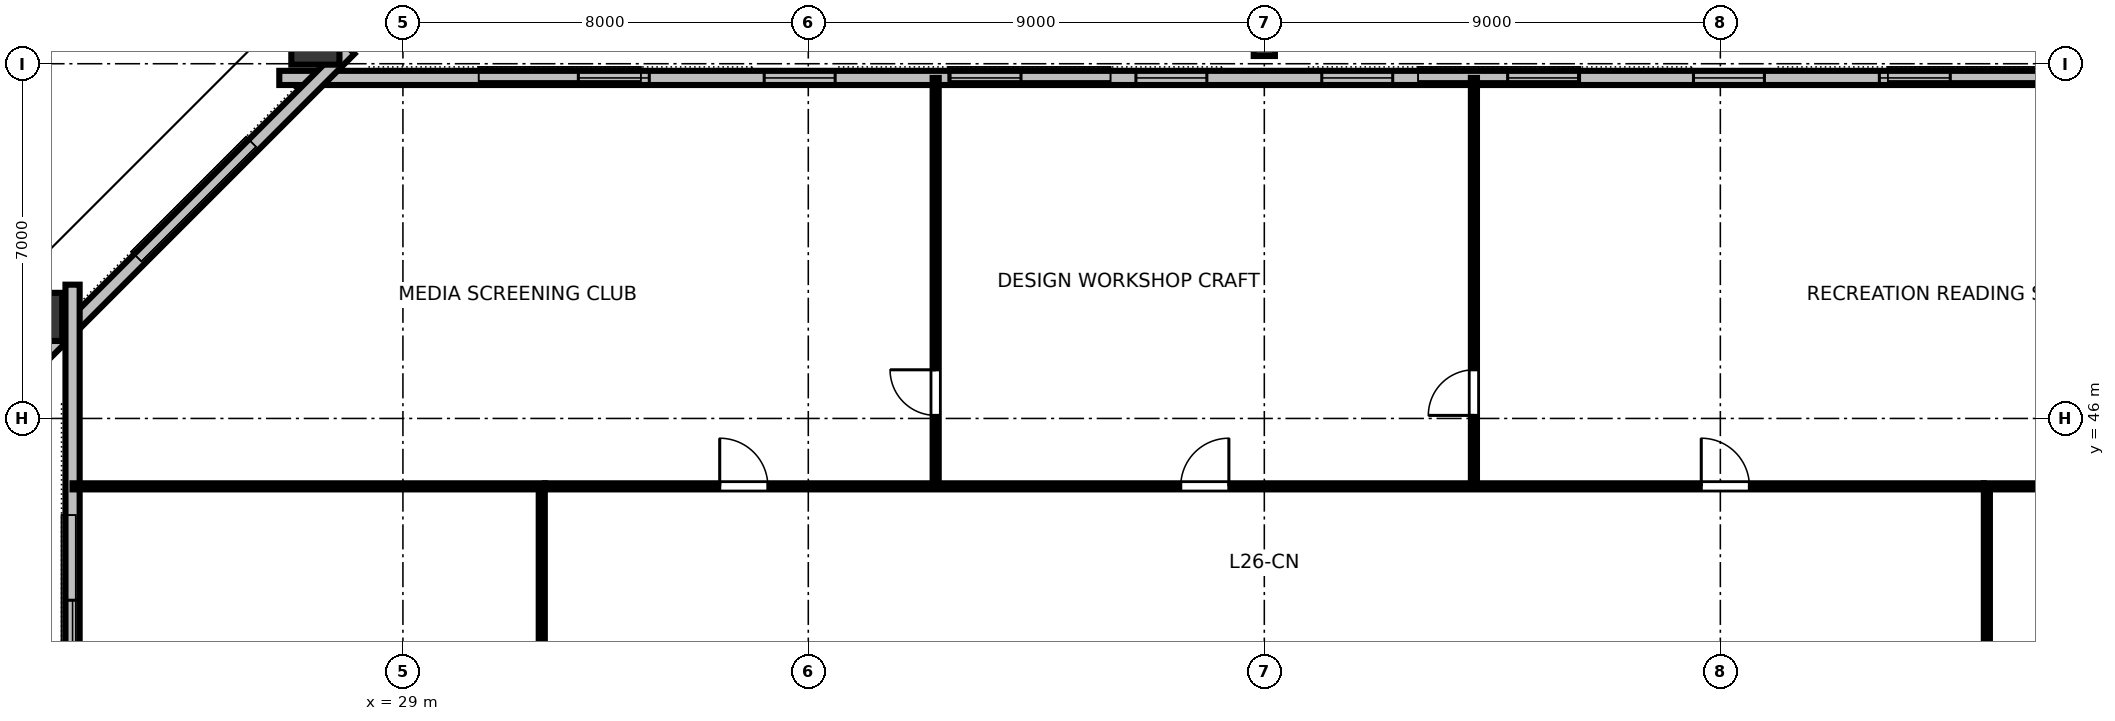
"""IFC4 building model, lengths in metres.
Left out: names, types, materials, properties, quantities, classifications, styles, units other than length and angle.
Written with IfcOpenShell. Run it as: python <this file> out.ifc"""

import sys

from ifc_helpers import new_model, si_unit, direction, frame, frame_2d, origin, origin_2d, place, context, subcontext, project, spatial, rectangle, hollow_rectangle, i_section, extrude, element, fill, save


model = new_model("IFC4")
c1 = context("Model", 3, precision=1e-05, world=origin(), true_north=direction((0.0, 1.0)))
c2 = subcontext(c1, "Body", "Model", "MODEL_VIEW")
j1 = project(units=[si_unit("LENGTHUNIT", "METRE"), si_unit("PLANEANGLEUNIT", "RADIAN")], contexts=[c1])
p1 = place(None, origin())
s1 = spatial("IfcSite", under=j1, at=p1, CompositionType="ELEMENT")
p2 = place(p1, origin())
s2 = spatial("IfcBuilding", under=s1, at=p2, CompositionType="ELEMENT")
p3 = place(p2, frame((0.0, 0.0, 102.4)))
s3 = spatial("IfcBuildingStorey", under=s2, at=p3, CompositionType="ELEMENT", Elevation=102.4)
p4 = place(p3, frame((46.0, 53.38, 0.0), z_axis=(0.0, -0.161571146621, 0.986861066503), x_axis=(1.0, 0.0, 0.0)))
e1 = element("IfcColumn", 1, at=p4, inside=s3, PredefinedType="COLUMN", context=c2, shape_type="SweptSolid", body=[
    extrude(i_section(OverallWidth=0.418, OverallDepth=0.455, WebThickness=0.042, FlangeThickness=0.068, FilletRadius=0.025, at=origin_2d()), origin(), (0.0, 0.0, 1.0), 3.403),
])
p5 = place(p3, frame((27.272, 53.556, 0.0), z_axis=(0.227502922189, -0.158490675606, 0.960792967367), x_axis=(0.571617951621, 0.820519906757, 0.0)))
e2 = element("IfcColumn", 2, at=p5, inside=s3, PredefinedType="COLUMN", context=c2, shape_type="SweptSolid", body=[
    extrude(hollow_rectangle(XDim=0.95, YDim=1.15, WallThickness=0.06, at=origin_2d()), origin(), (0.0, 0.0, 1.0), 3.495),
])
p6 = place(p3, frame((21.701, 48.004, 0.0), z_axis=(0.187073570433, -0.199172160222, 0.961942789275), x_axis=(-0.658567101109, 0.701158543536, 0.273250928932)))
e3 = element("IfcColumn", 3, at=p6, inside=s3, PredefinedType="COLUMN", context=c2, shape_type="SweptSolid", body=[
    extrude(hollow_rectangle(XDim=0.95, YDim=1.15, WallThickness=0.06, at=origin_2d()), origin(), (0.0, 0.0, 1.0), 3.491),
])
p7 = place(p3, frame((65.44, 52.72, 0.0), z_axis=(0.0, 0.0, 1.0), x_axis=(-1.0, 0.0, 0.0)))
e4 = element("IfcWall", 4, at=p7, inside=s3, PredefinedType="STANDARD", context=c2, shape_type="SweptSolid", body=[
    extrude(rectangle(XDim=38.88, YDim=0.28, at=frame_2d((19.44, 0.0))), origin(), (0.0, 0.0, 1.0), 2.662),
])
p8 = place(p7, frame((5.902, 0.0, 0.85)))
e5 = element("IfcOpeningElement", 5, at=p8, cuts=e4, PredefinedType="OPENING", context=c2, shape_type="SweptSolid", body=[
    extrude(rectangle(XDim=1.4, YDim=1.2, at=frame_2d((0.7, 0.6))), frame((0.0, 0.15, 0.0), z_axis=(0.0, -1.0, 0.0), x_axis=(1.0, 0.0, 0.0)), (0.0, 0.0, 1.0), 0.3),
])
p9 = place(p7, frame((9.57, 0.0, 0.85)))
e6 = element("IfcOpeningElement", 6, at=p9, cuts=e4, PredefinedType="OPENING", context=c2, shape_type="SweptSolid", body=[
    extrude(rectangle(XDim=1.4, YDim=1.2, at=frame_2d((0.7, 0.6))), frame((0.0, 0.15, 0.0), z_axis=(0.0, -1.0, 0.0), x_axis=(1.0, 0.0, 0.0)), (0.0, 0.0, 1.0), 0.3),
])
p10 = place(p7, frame((13.238, 0.0, 0.85)))
e7 = element("IfcOpeningElement", 7, at=p10, cuts=e4, PredefinedType="OPENING", context=c2, shape_type="SweptSolid", body=[
    extrude(rectangle(XDim=1.4, YDim=1.2, at=frame_2d((0.7, 0.6))), frame((0.0, 0.15, 0.0), z_axis=(0.0, -1.0, 0.0), x_axis=(1.0, 0.0, 0.0)), (0.0, 0.0, 1.0), 0.3),
])
p11 = place(p7, frame((16.906, 0.0, 0.85)))
e8 = element("IfcOpeningElement", 8, at=p11, cuts=e4, PredefinedType="OPENING", context=c2, shape_type="SweptSolid", body=[
    extrude(rectangle(XDim=1.4, YDim=1.2, at=frame_2d((0.7, 0.6))), frame((0.0, 0.15, 0.0), z_axis=(0.0, -1.0, 0.0), x_axis=(1.0, 0.0, 0.0)), (0.0, 0.0, 1.0), 0.3),
])
p12 = place(p7, frame((20.574, 0.0, 0.85)))
e9 = element("IfcOpeningElement", 9, at=p12, cuts=e4, PredefinedType="OPENING", context=c2, shape_type="SweptSolid", body=[
    extrude(rectangle(XDim=1.4, YDim=1.2, at=frame_2d((0.7, 0.6))), frame((0.0, 0.15, 0.0), z_axis=(0.0, -1.0, 0.0), x_axis=(1.0, 0.0, 0.0)), (0.0, 0.0, 1.0), 0.3),
])
p13 = place(p7, frame((24.242, 0.0, 0.85)))
e10 = element("IfcOpeningElement", 10, at=p13, cuts=e4, PredefinedType="OPENING", context=c2, shape_type="SweptSolid", body=[
    extrude(rectangle(XDim=1.4, YDim=1.2, at=frame_2d((0.7, 0.6))), frame((0.0, 0.15, 0.0), z_axis=(0.0, -1.0, 0.0), x_axis=(1.0, 0.0, 0.0)), (0.0, 0.0, 1.0), 0.3),
])
p14 = place(p7, frame((27.91, 0.0, 0.85)))
e11 = element("IfcOpeningElement", 11, at=p14, cuts=e4, PredefinedType="OPENING", context=c2, shape_type="SweptSolid", body=[
    extrude(rectangle(XDim=1.4, YDim=1.2, at=frame_2d((0.7, 0.6))), frame((0.0, 0.15, 0.0), z_axis=(0.0, -1.0, 0.0), x_axis=(1.0, 0.0, 0.0)), (0.0, 0.0, 1.0), 0.3),
])
p15 = place(p7, frame((31.578, 0.0, 0.85)))
e12 = element("IfcOpeningElement", 12, at=p15, cuts=e4, PredefinedType="OPENING", context=c2, shape_type="SweptSolid", body=[
    extrude(rectangle(XDim=1.4, YDim=1.2, at=frame_2d((0.7, 0.6))), frame((0.0, 0.15, 0.0), z_axis=(0.0, -1.0, 0.0), x_axis=(1.0, 0.0, 0.0)), (0.0, 0.0, 1.0), 0.3),
])
p16 = place(p3, frame((27.946, 53.294, 0.0), z_axis=(0.0, 0.0, 1.0), x_axis=(-0.707106781187, -0.707106781187, 0.0)))
e13 = element("IfcWall", 13, at=p16, inside=s3, PredefinedType="STANDARD", context=c2, shape_type="SweptSolid", body=[
    extrude(rectangle(XDim=8.541, YDim=0.28, at=frame_2d((4.271, 0.0))), origin(), (0.0, 0.0, 1.0), 2.662),
])
p17 = place(p3, frame((22.48, 48.64, 0.0), z_axis=(0.0, 0.0, 1.0), x_axis=(0.0, -1.0, 0.0)))
e14 = element("IfcWall", 14, at=p17, inside=s3, PredefinedType="STANDARD", context=c2, shape_type="SweptSolid", body=[
    extrude(rectangle(XDim=33.28, YDim=0.28, at=frame_2d((16.64, 0.0))), origin(), (0.0, 0.0, 1.0), 2.662),
])
p18 = place(p17, frame((6.228, 0.0, 0.85)))
e15 = element("IfcOpeningElement", 15, at=p18, cuts=e14, PredefinedType="OPENING", context=c2, shape_type="SweptSolid", body=[
    extrude(rectangle(XDim=1.4, YDim=1.2, at=frame_2d((0.7, 0.6))), frame((0.0, 0.15, 0.0), z_axis=(0.0, -1.0, 0.0), x_axis=(1.0, 0.0, 0.0)), (0.0, 0.0, 1.0), 0.3),
])
p19 = place(p17, frame((10.113, 0.0, 0.85)))
e16 = element("IfcOpeningElement", 16, at=p19, cuts=e14, PredefinedType="OPENING", context=c2, shape_type="SweptSolid", body=[
    extrude(rectangle(XDim=1.4, YDim=1.2, at=frame_2d((0.7, 0.6))), frame((0.0, 0.15, 0.0), z_axis=(0.0, -1.0, 0.0), x_axis=(1.0, 0.0, 0.0)), (0.0, 0.0, 1.0), 0.3),
])
p20 = place(p17, frame((13.998, 0.0, 0.85)))
e17 = element("IfcOpeningElement", 17, at=p20, cuts=e14, PredefinedType="OPENING", context=c2, shape_type="SweptSolid", body=[
    extrude(rectangle(XDim=1.4, YDim=1.2, at=frame_2d((0.7, 0.6))), frame((0.0, 0.15, 0.0), z_axis=(0.0, -1.0, 0.0), x_axis=(1.0, 0.0, 0.0)), (0.0, 0.0, 1.0), 0.3),
])
p21 = place(p17, frame((17.883, 0.0, 0.85)))
e18 = element("IfcOpeningElement", 18, at=p21, cuts=e14, PredefinedType="OPENING", context=c2, shape_type="SweptSolid", body=[
    extrude(rectangle(XDim=1.4, YDim=1.2, at=frame_2d((0.7, 0.6))), frame((0.0, 0.15, 0.0), z_axis=(0.0, -1.0, 0.0), x_axis=(1.0, 0.0, 0.0)), (0.0, 0.0, 1.0), 0.3),
])
p22 = place(p17, frame((21.768, 0.0, 0.85)))
e19 = element("IfcOpeningElement", 19, at=p22, cuts=e14, PredefinedType="OPENING", context=c2, shape_type="SweptSolid", body=[
    extrude(rectangle(XDim=1.4, YDim=1.2, at=frame_2d((0.7, 0.6))), frame((0.0, 0.15, 0.0), z_axis=(0.0, -1.0, 0.0), x_axis=(1.0, 0.0, 0.0)), (0.0, 0.0, 1.0), 0.3),
])
p23 = place(p17, frame((25.653, 0.0, 0.85)))
e20 = element("IfcOpeningElement", 20, at=p23, cuts=e14, PredefinedType="OPENING", context=c2, shape_type="SweptSolid", body=[
    extrude(rectangle(XDim=1.4, YDim=1.2, at=frame_2d((0.7, 0.6))), frame((0.0, 0.15, 0.0), z_axis=(0.0, -1.0, 0.0), x_axis=(1.0, 0.0, 0.0)), (0.0, 0.0, 1.0), 0.3),
])
p24 = place(p3, frame((39.514, 44.66, 0.0), z_axis=(0.0, 0.0, 1.0), x_axis=(0.0, 1.0, 0.0)))
e21 = element("IfcWall", 21, at=p24, inside=s3, PredefinedType="PARTITIONING", context=c2, shape_type="SweptSolid", body=[
    extrude(rectangle(XDim=8.06, YDim=0.12, at=frame_2d((4.03, 0.0))), origin(), (0.0, 0.0, 1.0), 2.64),
])
p25 = place(p24, frame((1.4, 0.0, 0.0)))
e22 = element("IfcOpeningElement", 22, at=p25, cuts=e21, PredefinedType="OPENING", context=c2, shape_type="SweptSolid", body=[
    extrude(rectangle(XDim=0.9, YDim=2.15, at=frame_2d((0.45, 1.075))), frame((0.0, 0.07, 0.0), z_axis=(0.0, -1.0, 0.0), x_axis=(1.0, 0.0, 0.0)), (0.0, 0.0, 1.0), 0.14),
])
p26 = place(p3, frame((50.137, 44.66, 0.0), z_axis=(0.0, 0.0, 1.0), x_axis=(0.0, 1.0, 0.0)))
e23 = element("IfcWall", 23, at=p26, inside=s3, PredefinedType="PARTITIONING", context=c2, shape_type="SweptSolid", body=[
    extrude(rectangle(XDim=8.06, YDim=0.12, at=frame_2d((4.03, 0.0))), origin(), (0.0, 0.0, 1.0), 2.64),
])
p27 = place(p26, frame((1.4, 0.0, 0.0)))
e24 = element("IfcOpeningElement", 24, at=p27, cuts=e23, PredefinedType="OPENING", context=c2, shape_type="SweptSolid", body=[
    extrude(rectangle(XDim=0.9, YDim=2.15, at=frame_2d((0.45, 1.075))), frame((0.0, 0.07, 0.0), z_axis=(0.0, -1.0, 0.0), x_axis=(1.0, 0.0, 0.0)), (0.0, 0.0, 1.0), 0.14),
])
p28 = place(p3, frame((31.8, 44.66, 0.0), z_axis=(0.0, 0.0, 1.0), x_axis=(1.0, 0.0, 0.0)))
e25 = element("IfcWall", 25, at=p28, inside=s3, PredefinedType="PARTITIONING", context=c2, shape_type="SweptSolid", body=[
    extrude(rectangle(XDim=28.4, YDim=0.12, at=frame_2d((14.2, 0.0))), origin(), (0.0, 0.0, 1.0), 2.64),
])
p29 = place(p28, frame((3.452, 0.0, 0.0)))
e26 = element("IfcOpeningElement", 26, at=p29, cuts=e25, PredefinedType="OPENING", context=c2, shape_type="SweptSolid", body=[
    extrude(rectangle(XDim=0.95, YDim=2.15, at=frame_2d((0.475, 1.075))), frame((0.0, 0.07, 0.0), z_axis=(0.0, -1.0, 0.0), x_axis=(1.0, 0.0, 0.0)), (0.0, 0.0, 1.0), 0.14),
])
p30 = place(p28, frame((12.551, 0.0, 0.0)))
e27 = element("IfcOpeningElement", 27, at=p30, cuts=e25, PredefinedType="OPENING", context=c2, shape_type="SweptSolid", body=[
    extrude(rectangle(XDim=0.95, YDim=2.15, at=frame_2d((0.475, 1.075))), frame((0.0, 0.07, 0.0), z_axis=(0.0, -1.0, 0.0), x_axis=(1.0, 0.0, 0.0)), (0.0, 0.0, 1.0), 0.14),
])
p31 = place(p28, frame((22.823, 0.0, 0.0)))
e28 = element("IfcOpeningElement", 28, at=p31, cuts=e25, PredefinedType="OPENING", context=c2, shape_type="SweptSolid", body=[
    extrude(rectangle(XDim=0.95, YDim=2.15, at=frame_2d((0.475, 1.075))), frame((0.0, 0.07, 0.0), z_axis=(0.0, -1.0, 0.0), x_axis=(1.0, 0.0, 0.0)), (0.0, 0.0, 1.0), 0.14),
])
p32 = place(p3, frame((31.74, 33.02, 0.0), z_axis=(0.0, 0.0, 1.0), x_axis=(0.0, 1.0, 0.0)))
e29 = element("IfcWall", 29, at=p32, inside=s3, PredefinedType="PARTITIONING", context=c2, shape_type="SweptSolid", body=[
    extrude(rectangle(XDim=11.58, YDim=0.12, at=frame_2d((5.79, 0.0))), origin(), (0.0, 0.0, 1.0), 2.64),
])
p33 = place(p32, frame((0.621, 0.0, 0.0)))
e30 = element("IfcOpeningElement", 30, at=p33, cuts=e29, PredefinedType="OPENING", context=c2, shape_type="SweptSolid", body=[
    extrude(rectangle(XDim=0.95, YDim=2.15, at=frame_2d((0.475, 1.075))), frame((0.0, 0.07, 0.0), z_axis=(0.0, -1.0, 0.0), x_axis=(1.0, 0.0, 0.0)), (0.0, 0.0, 1.0), 0.14),
])
p34 = place(p32, frame((6.311, 0.0, 0.0)))
e31 = element("IfcOpeningElement", 31, at=p34, cuts=e29, PredefinedType="OPENING", context=c2, shape_type="SweptSolid", body=[
    extrude(rectangle(XDim=0.95, YDim=2.15, at=frame_2d((0.475, 1.075))), frame((0.0, 0.07, 0.0), z_axis=(0.0, -1.0, 0.0), x_axis=(1.0, 0.0, 0.0)), (0.0, 0.0, 1.0), 0.14),
])
p35 = place(p3, frame((60.26, 33.02, 0.0), z_axis=(0.0, 0.0, 1.0), x_axis=(0.0, 1.0, 0.0)))
e32 = element("IfcWall", 32, at=p35, inside=s3, PredefinedType="PARTITIONING", context=c2, shape_type="SweptSolid", body=[
    extrude(rectangle(XDim=11.58, YDim=0.12, at=frame_2d((5.79, 0.0))), origin(), (0.0, 0.0, 1.0), 2.64),
])
p36 = place(p35, frame((5.215, 0.0, 0.0)))
e33 = element("IfcOpeningElement", 33, at=p36, cuts=e32, PredefinedType="OPENING", context=c2, shape_type="SweptSolid", body=[
    extrude(rectangle(XDim=0.95, YDim=2.15, at=frame_2d((0.475, 1.075))), frame((0.0, 0.07, 0.0), z_axis=(0.0, -1.0, 0.0), x_axis=(1.0, 0.0, 0.0)), (0.0, 0.0, 1.0), 0.14),
])
for number, where, z_axis, x_axis in (
    (34, (31.8, 44.66, 0.0), (0.0, 0.0, 1.0), (-1.0, 0.0, 0.0)),
    (35, (60.2, 44.66, 0.0), (0.0, 0.0, 1.0), (1.0, 0.0, 0.0)),
):
    element("IfcWall", number, at=place(p3, frame(where, z_axis=z_axis, x_axis=x_axis)), inside=s3, PredefinedType="PARTITIONING", context=c2, shape_type="SweptSolid", body=[
        extrude(rectangle(XDim=9.32, YDim=0.12, at=frame_2d((4.66, 0.0))), origin(), (0.0, 0.0, 1.0), 2.64),
    ])
p37 = place(p8, origin())
e36 = element("IfcWindow", 36, at=p37, inside=s3, PartitioningType="SINGLE_PANEL", PredefinedType="WINDOW", context=c2, shape_type="SweptSolid", body=[
    extrude(rectangle(XDim=1.4, YDim=1.2, at=frame_2d((0.7, 0.6))), frame((0.0, 0.03, 0.0), z_axis=(0.0, -1.0, 0.0), x_axis=(1.0, 0.0, 0.0)), (0.0, 0.0, 1.0), 0.06),
])
fill(e5, e36)
p38 = place(p9, origin())
e37 = element("IfcWindow", 37, at=p38, inside=s3, PartitioningType="SINGLE_PANEL", PredefinedType="WINDOW", context=c2, shape_type="SweptSolid", body=[
    extrude(rectangle(XDim=1.4, YDim=1.2, at=frame_2d((0.7, 0.6))), frame((0.0, 0.03, 0.0), z_axis=(0.0, -1.0, 0.0), x_axis=(1.0, 0.0, 0.0)), (0.0, 0.0, 1.0), 0.06),
])
fill(e6, e37)
p39 = place(p10, origin())
e38 = element("IfcWindow", 38, at=p39, inside=s3, PartitioningType="SINGLE_PANEL", PredefinedType="WINDOW", context=c2, shape_type="SweptSolid", body=[
    extrude(rectangle(XDim=1.4, YDim=1.2, at=frame_2d((0.7, 0.6))), frame((0.0, 0.03, 0.0), z_axis=(0.0, -1.0, 0.0), x_axis=(1.0, 0.0, 0.0)), (0.0, 0.0, 1.0), 0.06),
])
fill(e7, e38)
p40 = place(p11, origin())
e39 = element("IfcWindow", 39, at=p40, inside=s3, PartitioningType="SINGLE_PANEL", PredefinedType="WINDOW", context=c2, shape_type="SweptSolid", body=[
    extrude(rectangle(XDim=1.4, YDim=1.2, at=frame_2d((0.7, 0.6))), frame((0.0, 0.03, 0.0), z_axis=(0.0, -1.0, 0.0), x_axis=(1.0, 0.0, 0.0)), (0.0, 0.0, 1.0), 0.06),
])
fill(e8, e39)
p41 = place(p12, origin())
e40 = element("IfcWindow", 40, at=p41, inside=s3, PartitioningType="SINGLE_PANEL", PredefinedType="WINDOW", context=c2, shape_type="SweptSolid", body=[
    extrude(rectangle(XDim=1.4, YDim=1.2, at=frame_2d((0.7, 0.6))), frame((0.0, 0.03, 0.0), z_axis=(0.0, -1.0, 0.0), x_axis=(1.0, 0.0, 0.0)), (0.0, 0.0, 1.0), 0.06),
])
fill(e9, e40)
p42 = place(p13, origin())
e41 = element("IfcWindow", 41, at=p42, inside=s3, PartitioningType="SINGLE_PANEL", PredefinedType="WINDOW", context=c2, shape_type="SweptSolid", body=[
    extrude(rectangle(XDim=1.4, YDim=1.2, at=frame_2d((0.7, 0.6))), frame((0.0, 0.03, 0.0), z_axis=(0.0, -1.0, 0.0), x_axis=(1.0, 0.0, 0.0)), (0.0, 0.0, 1.0), 0.06),
])
fill(e10, e41)
p43 = place(p14, origin())
e42 = element("IfcWindow", 42, at=p43, inside=s3, PartitioningType="SINGLE_PANEL", PredefinedType="WINDOW", context=c2, shape_type="SweptSolid", body=[
    extrude(rectangle(XDim=1.4, YDim=1.2, at=frame_2d((0.7, 0.6))), frame((0.0, 0.03, 0.0), z_axis=(0.0, -1.0, 0.0), x_axis=(1.0, 0.0, 0.0)), (0.0, 0.0, 1.0), 0.06),
])
fill(e11, e42)
p44 = place(p15, origin())
e43 = element("IfcWindow", 43, at=p44, inside=s3, PartitioningType="SINGLE_PANEL", PredefinedType="WINDOW", context=c2, shape_type="SweptSolid", body=[
    extrude(rectangle(XDim=1.4, YDim=1.2, at=frame_2d((0.7, 0.6))), frame((0.0, 0.03, 0.0), z_axis=(0.0, -1.0, 0.0), x_axis=(1.0, 0.0, 0.0)), (0.0, 0.0, 1.0), 0.06),
])
fill(e12, e43)
p45 = place(p18, origin())
e44 = element("IfcWindow", 44, at=p45, inside=s3, PartitioningType="SINGLE_PANEL", PredefinedType="WINDOW", context=c2, shape_type="SweptSolid", body=[
    extrude(rectangle(XDim=1.4, YDim=1.2, at=frame_2d((0.7, 0.6))), frame((0.0, 0.03, 0.0), z_axis=(0.0, -1.0, 0.0), x_axis=(1.0, 0.0, 0.0)), (0.0, 0.0, 1.0), 0.06),
])
fill(e15, e44)
p46 = place(p25, origin())
e45 = element("IfcDoor", 45, at=p46, inside=s3, OperationType="SINGLE_SWING_RIGHT", PredefinedType="DOOR", context=c2, shape_type="SweptSolid", body=[
    extrude(rectangle(XDim=0.9, YDim=2.15, at=frame_2d((0.45, 1.075))), frame((0.0, 0.025, 0.0), z_axis=(0.0, -1.0, 0.0), x_axis=(1.0, 0.0, 0.0)), (0.0, 0.0, 1.0), 0.05),
])
fill(e22, e45)
p47 = place(p27, origin())
e46 = element("IfcDoor", 46, at=p47, inside=s3, OperationType="SINGLE_SWING_LEFT", PredefinedType="DOOR", context=c2, shape_type="SweptSolid", body=[
    extrude(rectangle(XDim=0.9, YDim=2.15, at=frame_2d((0.45, 1.075))), frame((0.0, 0.025, 0.0), z_axis=(0.0, -1.0, 0.0), x_axis=(1.0, 0.0, 0.0)), (0.0, 0.0, 1.0), 0.05),
])
fill(e24, e46)
p48 = place(p29, origin())
e47 = element("IfcDoor", 47, at=p48, inside=s3, OperationType="SINGLE_SWING_LEFT", PredefinedType="DOOR", context=c2, shape_type="SweptSolid", body=[
    extrude(rectangle(XDim=0.95, YDim=2.15, at=frame_2d((0.475, 1.075))), frame((0.0, 0.025, 0.0), z_axis=(0.0, -1.0, 0.0), x_axis=(1.0, 0.0, 0.0)), (0.0, 0.0, 1.0), 0.05),
])
fill(e26, e47)
p49 = place(p30, origin())
e48 = element("IfcDoor", 48, at=p49, inside=s3, OperationType="SINGLE_SWING_RIGHT", PredefinedType="DOOR", context=c2, shape_type="SweptSolid", body=[
    extrude(rectangle(XDim=0.95, YDim=2.15, at=frame_2d((0.475, 1.075))), frame((0.0, 0.025, 0.0), z_axis=(0.0, -1.0, 0.0), x_axis=(1.0, 0.0, 0.0)), (0.0, 0.0, 1.0), 0.05),
])
fill(e27, e48)
p50 = place(p31, origin())
e49 = element("IfcDoor", 49, at=p50, inside=s3, OperationType="SINGLE_SWING_LEFT", PredefinedType="DOOR", context=c2, shape_type="SweptSolid", body=[
    extrude(rectangle(XDim=0.95, YDim=2.15, at=frame_2d((0.475, 1.075))), frame((0.0, 0.025, 0.0), z_axis=(0.0, -1.0, 0.0), x_axis=(1.0, 0.0, 0.0)), (0.0, 0.0, 1.0), 0.05),
])
fill(e28, e49)
save(model, sys.argv[1])
